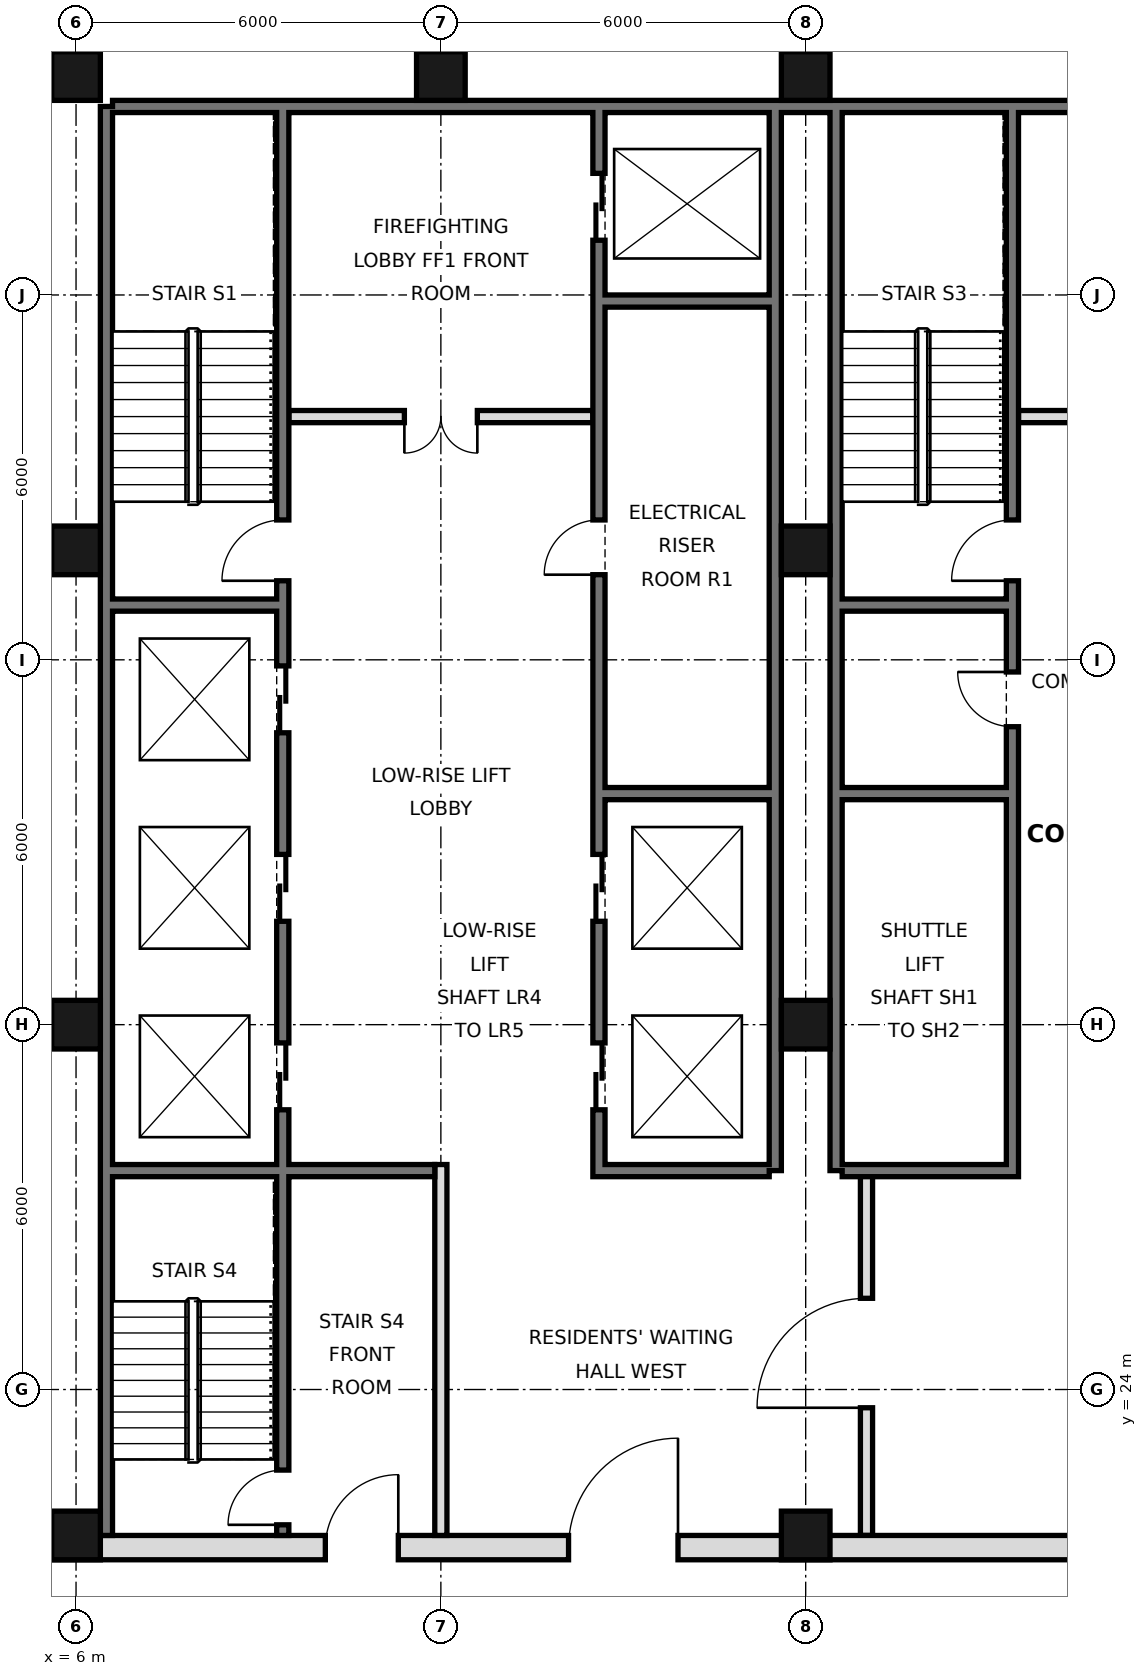
"""IFC4 building model, lengths in metres.
Left out: names, types, materials, properties, quantities, classifications, styles, units other than length and angle.
Written with IfcOpenShell. Run it as: python <this file> out.ifc"""

import sys

from ifc_helpers import new_model, si_unit, direction, frame, frame_2d, origin, origin_2d, place, context, subcontext, project, spatial, rectangle, hollow_rectangle, extrude, element, fill, save


model = new_model("IFC4")
c1 = context("Model", 3, precision=1e-05, world=origin(), true_north=direction((0.0, 1.0)))
c2 = subcontext(c1, "Body", "Model", "MODEL_VIEW")
j1 = project(units=[si_unit("LENGTHUNIT", "METRE"), si_unit("PLANEANGLEUNIT", "RADIAN")], contexts=[c1])
p1 = place(None, origin())
s1 = spatial("IfcSite", under=j1, at=p1, CompositionType="ELEMENT")
p2 = place(p1, origin())
s2 = spatial("IfcBuilding", under=s1, at=p2, CompositionType="ELEMENT")
p3 = place(p2, frame((0.0, 0.0, 57.0)))
s3 = spatial("IfcBuildingStorey", under=s2, at=p3, CompositionType="ELEMENT", Elevation=57.0)
for number, where, z_axis, x_axis in (
    (1, (6.0, 21.6, 0.0), (0.0, 0.0, 1.0), (1.0, 0.0, 0.0)),
    (2, (6.0, 30.0, 0.0), (0.0, 0.0, 1.0), (1.0, 0.0, 0.0)),
    (3, (6.0, 37.8, 0.0), (0.0, 0.0, 1.0), (1.0, 0.0, 0.0)),
    (4, (6.0, 45.6, 0.0), (0.0, 0.0, 1.0), (1.0, 0.0, 0.0)),
    (5, (12.0, 45.6, 0.0), (0.0, 0.0, 1.0), (1.0, 0.0, 0.0)),
    (6, (18.0, 21.6, 0.0), (0.0, 0.0, 1.0), (1.0, 0.0, 0.0)),
    (7, (18.0, 30.0, 0.0), (0.0, 0.0, 1.0), (1.0, 0.0, 0.0)),
    (8, (18.0, 37.8, 0.0), (0.0, 0.0, 1.0), (1.0, 0.0, 0.0)),
    (9, (18.0, 45.6, 0.0), (0.0, 0.0, 1.0), (1.0, 0.0, 0.0)),
):
    element("IfcColumn", number, at=place(p3, frame(where, z_axis=z_axis, x_axis=x_axis)), inside=s3, PredefinedType="COLUMN", context=c2, shape_type="SweptSolid", body=[
        extrude(hollow_rectangle(XDim=0.8, YDim=0.8, WallThickness=0.06, at=origin_2d()), origin(), (0.0, 0.0, 1.0), 3.6),
    ])
p4 = place(p3, frame((6.5, 21.6, 0.0), z_axis=(0.0, 0.0, 1.0), x_axis=(0.0, 1.0, 0.0)))
e10 = element("IfcWall", 10, at=p4, inside=s3, PredefinedType="SOLIDWALL", context=c2, shape_type="SweptSolid", body=[
    extrude(rectangle(XDim=23.5, YDim=0.2, at=frame_2d((11.75, 0.0))), origin(), (0.0, 0.0, 1.0), 3.42),
])
p5 = place(p3, frame((6.6, 45.1, 0.0), z_axis=(0.0, 0.0, 1.0), x_axis=(1.0, 0.0, 0.0)))
e11 = element("IfcWall", 11, at=p5, inside=s3, PredefinedType="SOLIDWALL", context=c2, shape_type="SweptSolid", body=[
    extrude(rectangle(XDim=34.8, YDim=0.2, at=frame_2d((17.4, 0.0))), origin(), (0.0, 0.0, 1.0), 3.42),
])
for number, where, z_axis, x_axis in (
    (12, (17.5, 27.6, 0.0), (0.0, 0.0, 1.0), (0.0, 1.0, 0.0)),
    (13, (18.5, 27.6, 0.0), (0.0, 0.0, 1.0), (0.0, 1.0, 0.0)),
):
    element("IfcWall", number, at=place(p3, frame(where, z_axis=z_axis, x_axis=x_axis)), inside=s3, PredefinedType="SOLIDWALL", context=c2, shape_type="SweptSolid", body=[
        extrude(rectangle(XDim=17.5, YDim=0.2, at=frame_2d((8.75, 0.0))), origin(), (0.0, 0.0, 1.0), 3.42),
    ])
p6 = place(p3, frame((5.6, 21.4, 0.0), z_axis=(0.0, 0.0, 1.0), x_axis=(1.0, 0.0, 0.0)))
e14 = element("IfcWall", 14, at=p6, inside=s3, PredefinedType="SOLIDWALL", context=c2, shape_type="SweptSolid", body=[
    extrude(rectangle(XDim=36.8, YDim=0.4, at=frame_2d((18.4, 0.0))), origin(), (0.0, 0.0, 1.0), 3.42),
])
p7 = place(p6, frame((8.5, 0.0, 0.0)))
e15 = element("IfcOpeningElement", 15, at=p7, cuts=e14, PredefinedType="OPENING", context=c2, shape_type="SweptSolid", body=[
    extrude(rectangle(XDim=1.8, YDim=2.1, at=frame_2d((0.9, 1.05))), frame((0.0, 0.21, 0.0), z_axis=(0.0, -1.0, 0.0), x_axis=(1.0, 0.0, 0.0)), (0.0, 0.0, 1.0), 0.42),
])
p8 = place(p6, frame((17.5, 0.0, 0.0)))
e16 = element("IfcOpeningElement", 16, at=p8, cuts=e14, PredefinedType="OPENING", context=c2, shape_type="SweptSolid", body=[
    extrude(rectangle(XDim=1.8, YDim=2.1, at=frame_2d((0.9, 1.05))), frame((0.0, 0.21, 0.0), z_axis=(0.0, -1.0, 0.0), x_axis=(1.0, 0.0, 0.0)), (0.0, 0.0, 1.0), 0.42),
])
p9 = place(p6, frame((26.5, 0.0, 0.0)))
e17 = element("IfcOpeningElement", 17, at=p9, cuts=e14, PredefinedType="OPENING", context=c2, shape_type="SweptSolid", body=[
    extrude(rectangle(XDim=1.8, YDim=2.1, at=frame_2d((0.9, 1.05))), frame((0.0, 0.21, 0.0), z_axis=(0.0, -1.0, 0.0), x_axis=(1.0, 0.0, 0.0)), (0.0, 0.0, 1.0), 0.42),
])
p10 = place(p6, frame((4.5, 0.0, 0.0)))
e18 = element("IfcOpeningElement", 18, at=p10, cuts=e14, PredefinedType="OPENING", context=c2, shape_type="SweptSolid", body=[
    extrude(rectangle(XDim=1.2, YDim=2.1, at=frame_2d((0.6, 1.05))), frame((0.0, 0.21, 0.0), z_axis=(0.0, -1.0, 0.0), x_axis=(1.0, 0.0, 0.0)), (0.0, 0.0, 1.0), 0.42),
])
p11 = place(p6, frame((31.1, 0.0, 0.0)))
e19 = element("IfcOpeningElement", 19, at=p11, cuts=e14, PredefinedType="OPENING", context=c2, shape_type="SweptSolid", body=[
    extrude(rectangle(XDim=1.2, YDim=2.1, at=frame_2d((0.6, 1.05))), frame((0.0, 0.21, 0.0), z_axis=(0.0, -1.0, 0.0), x_axis=(1.0, 0.0, 0.0)), (0.0, 0.0, 1.0), 0.42),
])
p12 = place(p3, frame((19.0, 21.6, 0.0), z_axis=(0.0, 0.0, 1.0), x_axis=(0.0, 1.0, 0.0)))
e20 = element("IfcWall", 20, at=p12, inside=s3, PredefinedType="PARTITIONING", context=c2, shape_type="SweptSolid", body=[
    extrude(rectangle(XDim=6.0, YDim=0.2, at=frame_2d((3.0, 0.0))), origin(), (0.0, 0.0, 1.0), 3.42),
])
p13 = place(p12, frame((2.1, 0.0, 0.0)))
e21 = element("IfcOpeningElement", 21, at=p13, cuts=e20, PredefinedType="OPENING", context=c2, shape_type="SweptSolid", body=[
    extrude(rectangle(XDim=1.8, YDim=2.1, at=frame_2d((0.9, 1.05))), frame((0.0, 0.11, 0.0), z_axis=(0.0, -1.0, 0.0), x_axis=(1.0, 0.0, 0.0)), (0.0, 0.0, 1.0), 0.22),
])
p14 = place(p3, frame((12.0, 21.6, 0.0), z_axis=(0.0, 0.0, 1.0), x_axis=(0.0, 1.0, 0.0)))
e22 = element("IfcWall", 22, at=p14, inside=s3, PredefinedType="PARTITIONING", context=c2, shape_type="SweptSolid", body=[
    extrude(rectangle(XDim=6.1, YDim=0.2, at=frame_2d((3.05, 0.0))), origin(), (0.0, 0.0, 1.0), 3.42),
])
p15 = place(p3, frame((14.6, 27.5, 0.0), z_axis=(0.0, 0.0, 1.0), x_axis=(0.0, 1.0, 0.0)))
e23 = element("IfcWall", 23, at=p15, inside=s3, PredefinedType="SOLIDWALL", context=c2, shape_type="SweptSolid", body=[
    extrude(rectangle(XDim=17.5, YDim=0.2, at=frame_2d((8.75, 0.0))), origin(), (0.0, 0.0, 1.0), 3.42),
])
p16 = place(p15, frame((1.1, 0.0, 0.0)))
e24 = element("IfcOpeningElement", 24, at=p16, cuts=e23, PredefinedType="OPENING", context=c2, shape_type="SweptSolid", body=[
    extrude(rectangle(XDim=1.1, YDim=2.1, at=frame_2d((0.55, 1.05))), frame((0.0, 0.11, 0.0), z_axis=(0.0, -1.0, 0.0), x_axis=(1.0, 0.0, 0.0)), (0.0, 0.0, 1.0), 0.22),
])
p17 = place(p15, frame((4.2, 0.0, 0.0)))
e25 = element("IfcOpeningElement", 25, at=p17, cuts=e23, PredefinedType="OPENING", context=c2, shape_type="SweptSolid", body=[
    extrude(rectangle(XDim=1.1, YDim=2.1, at=frame_2d((0.55, 1.05))), frame((0.0, 0.11, 0.0), z_axis=(0.0, -1.0, 0.0), x_axis=(1.0, 0.0, 0.0)), (0.0, 0.0, 1.0), 0.22),
])
p18 = place(p15, frame((15.4, 0.0, 0.0)))
e26 = element("IfcOpeningElement", 26, at=p18, cuts=e23, PredefinedType="OPENING", context=c2, shape_type="SweptSolid", body=[
    extrude(rectangle(XDim=1.1, YDim=2.1, at=frame_2d((0.55, 1.05))), frame((0.0, 0.11, 0.0), z_axis=(0.0, -1.0, 0.0), x_axis=(1.0, 0.0, 0.0)), (0.0, 0.0, 1.0), 0.22),
])
p19 = place(p15, frame((9.9, 0.0, 0.0)))
e27 = element("IfcOpeningElement", 27, at=p19, cuts=e23, PredefinedType="OPENING", context=c2, shape_type="SweptSolid", body=[
    extrude(rectangle(XDim=0.9, YDim=2.1, at=frame_2d((0.45, 1.05))), frame((0.0, 0.11, 0.0), z_axis=(0.0, -1.0, 0.0), x_axis=(1.0, 0.0, 0.0)), (0.0, 0.0, 1.0), 0.22),
])
p20 = place(p3, frame((21.4, 27.5, 0.0), z_axis=(0.0, 0.0, 1.0), x_axis=(0.0, 1.0, 0.0)))
e28 = element("IfcWall", 28, at=p20, inside=s3, PredefinedType="SOLIDWALL", context=c2, shape_type="SweptSolid", body=[
    extrude(rectangle(XDim=17.5, YDim=0.2, at=frame_2d((8.75, 0.0))), origin(), (0.0, 0.0, 1.0), 3.42),
])
p21 = place(p20, frame((9.8, 0.0, 0.0)))
e29 = element("IfcOpeningElement", 29, at=p21, cuts=e28, PredefinedType="OPENING", context=c2, shape_type="SweptSolid", body=[
    extrude(rectangle(XDim=1.0, YDim=2.1, at=frame_2d((0.5, 1.05))), frame((0.0, 0.11, 0.0), z_axis=(0.0, -1.0, 0.0), x_axis=(1.0, 0.0, 0.0)), (0.0, 0.0, 1.0), 0.22),
])
p22 = place(p20, frame((7.4, 0.0, 0.0)))
e30 = element("IfcOpeningElement", 30, at=p22, cuts=e28, PredefinedType="OPENING", context=c2, shape_type="SweptSolid", body=[
    extrude(rectangle(XDim=0.9, YDim=2.1, at=frame_2d((0.45, 1.05))), frame((0.0, 0.11, 0.0), z_axis=(0.0, -1.0, 0.0), x_axis=(1.0, 0.0, 0.0)), (0.0, 0.0, 1.0), 0.22),
])
p23 = place(p3, frame((9.4, 21.6, 0.0), z_axis=(0.0, 0.0, 1.0), x_axis=(0.0, 1.0, 0.0)))
e31 = element("IfcWall", 31, at=p23, inside=s3, PredefinedType="SOLIDWALL", context=c2, shape_type="SweptSolid", body=[
    extrude(rectangle(XDim=23.4, YDim=0.2, at=frame_2d((11.7, 0.0))), origin(), (0.0, 0.0, 1.0), 3.42),
])
p24 = place(p23, frame((7.0, 0.0, 0.0)))
e32 = element("IfcOpeningElement", 32, at=p24, cuts=e31, PredefinedType="OPENING", context=c2, shape_type="SweptSolid", body=[
    extrude(rectangle(XDim=1.1, YDim=2.1, at=frame_2d((0.55, 1.05))), frame((0.0, 0.11, 0.0), z_axis=(0.0, -1.0, 0.0), x_axis=(1.0, 0.0, 0.0)), (0.0, 0.0, 1.0), 0.22),
])
p25 = place(p23, frame((10.1, 0.0, 0.0)))
e33 = element("IfcOpeningElement", 33, at=p25, cuts=e31, PredefinedType="OPENING", context=c2, shape_type="SweptSolid", body=[
    extrude(rectangle(XDim=1.1, YDim=2.1, at=frame_2d((0.55, 1.05))), frame((0.0, 0.11, 0.0), z_axis=(0.0, -1.0, 0.0), x_axis=(1.0, 0.0, 0.0)), (0.0, 0.0, 1.0), 0.22),
])
p26 = place(p23, frame((13.2, 0.0, 0.0)))
e34 = element("IfcOpeningElement", 34, at=p26, cuts=e31, PredefinedType="OPENING", context=c2, shape_type="SweptSolid", body=[
    extrude(rectangle(XDim=1.1, YDim=2.1, at=frame_2d((0.55, 1.05))), frame((0.0, 0.11, 0.0), z_axis=(0.0, -1.0, 0.0), x_axis=(1.0, 0.0, 0.0)), (0.0, 0.0, 1.0), 0.22),
])
p27 = place(p23, frame((15.7, 0.0, 0.0)))
e35 = element("IfcOpeningElement", 35, at=p27, cuts=e31, PredefinedType="OPENING", context=c2, shape_type="SweptSolid", body=[
    extrude(rectangle(XDim=1.0, YDim=2.1, at=frame_2d((0.5, 1.05))), frame((0.0, 0.11, 0.0), z_axis=(0.0, -1.0, 0.0), x_axis=(1.0, 0.0, 0.0)), (0.0, 0.0, 1.0), 0.22),
])
p28 = place(p23, frame((0.175, 0.0, 0.0)))
e36 = element("IfcOpeningElement", 36, at=p28, cuts=e31, PredefinedType="OPENING", context=c2, shape_type="SweptSolid", body=[
    extrude(rectangle(XDim=0.9, YDim=2.1, at=frame_2d((0.45, 1.05))), frame((0.0, 0.11, 0.0), z_axis=(0.0, -1.0, 0.0), x_axis=(1.0, 0.0, 0.0)), (0.0, 0.0, 1.0), 0.22),
])
for number, where, z_axis, x_axis in (
    (37, (14.7, 27.6, 0.0), (0.0, 0.0, 1.0), (1.0, 0.0, 0.0)),
    (38, (18.6, 27.6, 0.0), (0.0, 0.0, 1.0), (1.0, 0.0, 0.0)),
):
    element("IfcWall", number, at=place(p3, frame(where, z_axis=z_axis, x_axis=x_axis)), inside=s3, PredefinedType="SOLIDWALL", context=c2, shape_type="SweptSolid", body=[
        extrude(rectangle(XDim=2.7, YDim=0.2, at=frame_2d((1.35, 0.0))), origin(), (0.0, 0.0, 1.0), 3.42),
    ])
p29 = place(p3, frame((6.6, 27.6, 0.0), z_axis=(0.0, 0.0, 1.0), x_axis=(1.0, 0.0, 0.0)))
e39 = element("IfcWall", 39, at=p29, inside=s3, PredefinedType="SOLIDWALL", context=c2, shape_type="SweptSolid", body=[
    extrude(rectangle(XDim=5.3, YDim=0.2, at=frame_2d((2.65, 0.0))), origin(), (0.0, 0.0, 1.0), 3.42),
])
for number, where, z_axis, x_axis in (
    (40, (14.7, 33.8, 0.0), (0.0, 0.0, 1.0), (1.0, 0.0, 0.0)),
    (41, (18.6, 33.8, 0.0), (0.0, 0.0, 1.0), (1.0, 0.0, 0.0)),
    (42, (18.6, 36.9, 0.0), (0.0, 0.0, 1.0), (1.0, 0.0, 0.0)),
    (43, (6.6, 36.9, 0.0), (0.0, 0.0, 1.0), (1.0, 0.0, 0.0)),
):
    element("IfcWall", number, at=place(p3, frame(where, z_axis=z_axis, x_axis=x_axis)), inside=s3, PredefinedType="SOLIDWALL", context=c2, shape_type="SweptSolid", body=[
        extrude(rectangle(XDim=2.7, YDim=0.2, at=frame_2d((1.35, 0.0))), origin(), (0.0, 0.0, 1.0), 3.42),
    ])
p30 = place(p3, frame((21.5, 40.0, 0.0), z_axis=(0.0, 0.0, 1.0), x_axis=(1.0, 0.0, 0.0)))
e44 = element("IfcWall", 44, at=p30, inside=s3, PredefinedType="PARTITIONING", context=c2, shape_type="SweptSolid", body=[
    extrude(rectangle(XDim=5.0, YDim=0.2, at=frame_2d((2.5, 0.0))), origin(), (0.0, 0.0, 1.0), 3.42),
])
p31 = place(p30, frame((1.9, 0.0, 0.0)))
e45 = element("IfcOpeningElement", 45, at=p31, cuts=e44, PredefinedType="OPENING", context=c2, shape_type="SweptSolid", body=[
    extrude(rectangle(XDim=1.2, YDim=2.1, at=frame_2d((0.6, 1.05))), frame((0.0, 0.11, 0.0), z_axis=(0.0, -1.0, 0.0), x_axis=(1.0, 0.0, 0.0)), (0.0, 0.0, 1.0), 0.22),
])
p32 = place(p3, frame((9.5, 40.0, 0.0), z_axis=(0.0, 0.0, 1.0), x_axis=(1.0, 0.0, 0.0)))
e46 = element("IfcWall", 46, at=p32, inside=s3, PredefinedType="PARTITIONING", context=c2, shape_type="SweptSolid", body=[
    extrude(rectangle(XDim=5.0, YDim=0.2, at=frame_2d((2.5, 0.0))), origin(), (0.0, 0.0, 1.0), 3.42),
])
p33 = place(p32, frame((1.9, 0.0, 0.0)))
e47 = element("IfcOpeningElement", 47, at=p33, cuts=e46, PredefinedType="OPENING", context=c2, shape_type="SweptSolid", body=[
    extrude(rectangle(XDim=1.2, YDim=2.1, at=frame_2d((0.6, 1.05))), frame((0.0, 0.11, 0.0), z_axis=(0.0, -1.0, 0.0), x_axis=(1.0, 0.0, 0.0)), (0.0, 0.0, 1.0), 0.22),
])
p34 = place(p3, frame((14.7, 41.9, 0.0), z_axis=(0.0, 0.0, 1.0), x_axis=(1.0, 0.0, 0.0)))
e48 = element("IfcWall", 48, at=p34, inside=s3, PredefinedType="SOLIDWALL", context=c2, shape_type="SweptSolid", body=[
    extrude(rectangle(XDim=2.7, YDim=0.2, at=frame_2d((1.35, 0.0))), origin(), (0.0, 0.0, 1.0), 3.42),
])
p35 = place(p7, frame((1.8, 0.0, 0.0), z_axis=(0.0, 0.0, 1.0), x_axis=(-1.0, 0.0, 0.0)))
e49 = element("IfcDoor", 49, at=p35, inside=s3, OperationType="SINGLE_SWING_LEFT", PredefinedType="DOOR", context=c2, shape_type="SweptSolid", body=[
    extrude(rectangle(XDim=1.8, YDim=2.1, at=frame_2d((0.9, 1.05))), frame((0.0, 0.025, 0.0), z_axis=(0.0, -1.0, 0.0), x_axis=(1.0, 0.0, 0.0)), (0.0, 0.0, 1.0), 0.05),
])
fill(e15, e49)
p36 = place(p13, origin())
e50 = element("IfcDoor", 50, at=p36, inside=s3, OperationType="SINGLE_SWING_LEFT", PredefinedType="DOOR", context=c2, shape_type="SweptSolid", body=[
    extrude(rectangle(XDim=1.8, YDim=2.1, at=frame_2d((0.9, 1.05))), frame((0.0, 0.025, 0.0), z_axis=(0.0, -1.0, 0.0), x_axis=(1.0, 0.0, 0.0)), (0.0, 0.0, 1.0), 0.05),
])
fill(e21, e50)
p37 = place(p10, frame((1.2, 0.0, 0.0), z_axis=(0.0, 0.0, 1.0), x_axis=(-1.0, 0.0, 0.0)))
e51 = element("IfcDoor", 51, at=p37, inside=s3, OperationType="SINGLE_SWING_LEFT", PredefinedType="DOOR", context=c2, shape_type="SweptSolid", body=[
    extrude(rectangle(XDim=1.2, YDim=2.1, at=frame_2d((0.6, 1.05))), frame((0.0, 0.025, 0.0), z_axis=(0.0, -1.0, 0.0), x_axis=(1.0, 0.0, 0.0)), (0.0, 0.0, 1.0), 0.05),
])
fill(e18, e51)
p38 = place(p33, frame((1.2, 0.0, 0.0), z_axis=(0.0, 0.0, 1.0), x_axis=(-1.0, 0.0, 0.0)))
e52 = element("IfcDoor", 52, at=p38, inside=s3, OperationType="DOUBLE_DOOR_SINGLE_SWING", PredefinedType="DOOR", context=c2, shape_type="SweptSolid", body=[
    extrude(rectangle(XDim=1.2, YDim=2.1, at=frame_2d((0.6, 1.05))), frame((0.0, 0.025, 0.0), z_axis=(0.0, -1.0, 0.0), x_axis=(1.0, 0.0, 0.0)), (0.0, 0.0, 1.0), 0.05),
])
fill(e47, e52)
p39 = place(p16, origin())
e53 = element("IfcDoor", 53, at=p39, inside=s3, OperationType="DOUBLE_DOOR_SLIDING", PredefinedType="DOOR", context=c2, shape_type="SweptSolid", body=[
    extrude(rectangle(XDim=1.1, YDim=2.1, at=frame_2d((0.55, 1.05))), frame((0.0, 0.025, 0.0), z_axis=(0.0, -1.0, 0.0), x_axis=(1.0, 0.0, 0.0)), (0.0, 0.0, 1.0), 0.05),
])
fill(e24, e53)
p40 = place(p17, origin())
e54 = element("IfcDoor", 54, at=p40, inside=s3, OperationType="DOUBLE_DOOR_SLIDING", PredefinedType="DOOR", context=c2, shape_type="SweptSolid", body=[
    extrude(rectangle(XDim=1.1, YDim=2.1, at=frame_2d((0.55, 1.05))), frame((0.0, 0.025, 0.0), z_axis=(0.0, -1.0, 0.0), x_axis=(1.0, 0.0, 0.0)), (0.0, 0.0, 1.0), 0.05),
])
fill(e25, e54)
p41 = place(p18, origin())
e55 = element("IfcDoor", 55, at=p41, inside=s3, OperationType="DOUBLE_DOOR_SLIDING", PredefinedType="DOOR", context=c2, shape_type="SweptSolid", body=[
    extrude(rectangle(XDim=1.1, YDim=2.1, at=frame_2d((0.55, 1.05))), frame((0.0, 0.025, 0.0), z_axis=(0.0, -1.0, 0.0), x_axis=(1.0, 0.0, 0.0)), (0.0, 0.0, 1.0), 0.05),
])
fill(e26, e55)
p42 = place(p24, origin())
e56 = element("IfcDoor", 56, at=p42, inside=s3, OperationType="DOUBLE_DOOR_SLIDING", PredefinedType="DOOR", context=c2, shape_type="SweptSolid", body=[
    extrude(rectangle(XDim=1.1, YDim=2.1, at=frame_2d((0.55, 1.05))), frame((0.0, 0.025, 0.0), z_axis=(0.0, -1.0, 0.0), x_axis=(1.0, 0.0, 0.0)), (0.0, 0.0, 1.0), 0.05),
])
fill(e32, e56)
p43 = place(p25, origin())
e57 = element("IfcDoor", 57, at=p43, inside=s3, OperationType="DOUBLE_DOOR_SLIDING", PredefinedType="DOOR", context=c2, shape_type="SweptSolid", body=[
    extrude(rectangle(XDim=1.1, YDim=2.1, at=frame_2d((0.55, 1.05))), frame((0.0, 0.025, 0.0), z_axis=(0.0, -1.0, 0.0), x_axis=(1.0, 0.0, 0.0)), (0.0, 0.0, 1.0), 0.05),
])
fill(e33, e57)
p44 = place(p26, origin())
e58 = element("IfcDoor", 58, at=p44, inside=s3, OperationType="DOUBLE_DOOR_SLIDING", PredefinedType="DOOR", context=c2, shape_type="SweptSolid", body=[
    extrude(rectangle(XDim=1.1, YDim=2.1, at=frame_2d((0.55, 1.05))), frame((0.0, 0.025, 0.0), z_axis=(0.0, -1.0, 0.0), x_axis=(1.0, 0.0, 0.0)), (0.0, 0.0, 1.0), 0.05),
])
fill(e34, e58)
p45 = place(p27, origin())
e59 = element("IfcDoor", 59, at=p45, inside=s3, OperationType="SINGLE_SWING_LEFT", PredefinedType="DOOR", context=c2, shape_type="SweptSolid", body=[
    extrude(rectangle(XDim=1.0, YDim=2.1, at=frame_2d((0.5, 1.05))), frame((0.0, 0.025, 0.0), z_axis=(0.0, -1.0, 0.0), x_axis=(1.0, 0.0, 0.0)), (0.0, 0.0, 1.0), 0.05),
])
fill(e35, e59)
p46 = place(p21, origin())
e60 = element("IfcDoor", 60, at=p46, inside=s3, OperationType="SINGLE_SWING_LEFT", PredefinedType="DOOR", context=c2, shape_type="SweptSolid", body=[
    extrude(rectangle(XDim=1.0, YDim=2.1, at=frame_2d((0.5, 1.05))), frame((0.0, 0.025, 0.0), z_axis=(0.0, -1.0, 0.0), x_axis=(1.0, 0.0, 0.0)), (0.0, 0.0, 1.0), 0.05),
])
fill(e29, e60)
p47 = place(p28, origin())
e61 = element("IfcDoor", 61, at=p47, inside=s3, OperationType="SINGLE_SWING_LEFT", PredefinedType="DOOR", context=c2, shape_type="SweptSolid", body=[
    extrude(rectangle(XDim=0.9, YDim=2.1, at=frame_2d((0.45, 1.05))), frame((0.0, 0.025, 0.0), z_axis=(0.0, -1.0, 0.0), x_axis=(1.0, 0.0, 0.0)), (0.0, 0.0, 1.0), 0.05),
])
fill(e36, e61)
p48 = place(p19, origin())
e62 = element("IfcDoor", 62, at=p48, inside=s3, OperationType="SINGLE_SWING_LEFT", PredefinedType="DOOR", context=c2, shape_type="SweptSolid", body=[
    extrude(rectangle(XDim=0.9, YDim=2.1, at=frame_2d((0.45, 1.05))), frame((0.0, 0.025, 0.0), z_axis=(0.0, -1.0, 0.0), x_axis=(1.0, 0.0, 0.0)), (0.0, 0.0, 1.0), 0.05),
])
fill(e27, e62)
p49 = place(p22, frame((0.9, 0.0, 0.0), z_axis=(0.0, 0.0, 1.0), x_axis=(-1.0, 0.0, 0.0)))
e63 = element("IfcDoor", 63, at=p49, inside=s3, OperationType="SINGLE_SWING_LEFT", PredefinedType="DOOR", context=c2, shape_type="SweptSolid", body=[
    extrude(rectangle(XDim=0.9, YDim=2.1, at=frame_2d((0.45, 1.05))), frame((0.0, 0.025, 0.0), z_axis=(0.0, -1.0, 0.0), x_axis=(1.0, 0.0, 0.0)), (0.0, 0.0, 1.0), 0.05),
])
fill(e30, e63)
save(model, sys.argv[1])
